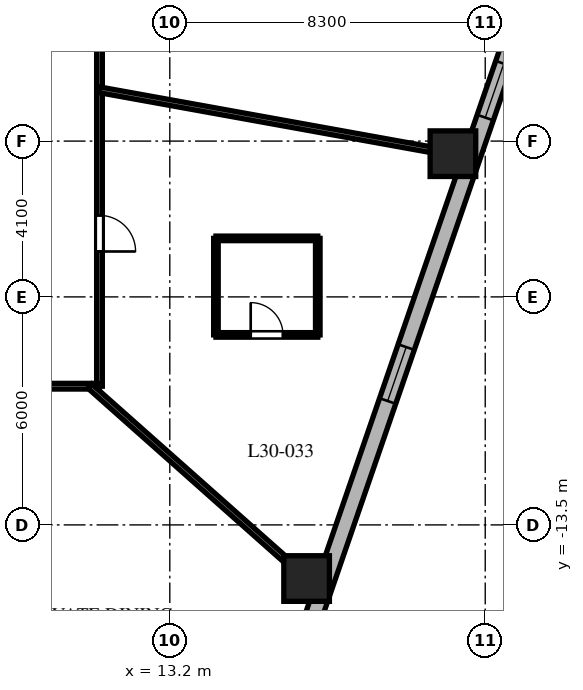
"""IFC4 building model, lengths in metres.
Left out: names, types, materials, properties, quantities, classifications, styles, units other than length and angle.
Written with IfcOpenShell. Run it as: python <this file> out.ifc"""

import sys

from ifc_helpers import new_model, si_unit, direction, frame, frame_2d, origin, origin_2d, place, context, subcontext, project, spatial, rectangle, extrude, element, fill, save


model = new_model("IFC4")
c1 = context("Model", 3, precision=1e-05, world=origin(), true_north=direction((0.0, 1.0)))
c2 = subcontext(c1, "Body", "Model", "MODEL_VIEW")
j1 = project(units=[si_unit("LENGTHUNIT", "METRE"), si_unit("PLANEANGLEUNIT", "RADIAN")], contexts=[c1])
p1 = place(None, origin())
s1 = spatial("IfcSite", under=j1, at=p1, CompositionType="ELEMENT")
p2 = place(p1, origin())
s2 = spatial("IfcBuilding", under=s1, at=p2, CompositionType="ELEMENT")
p3 = place(p2, frame((0.0, 0.0, 124.7)))
s3 = spatial("IfcBuildingStorey", under=s2, at=p3, CompositionType="ELEMENT", Elevation=124.7)
for number, where, z_axis, x_axis in (
    (1, (16.8, -14.911, 0.0), (0.0, 0.0, 1.0), (1.0, 0.0, 0.0)),
    (2, (20.65, -3.731, 0.0), (0.0, 0.0, 1.0), (1.0, 0.0, 0.0)),
):
    element("IfcColumn", number, at=place(p3, frame(where, z_axis=z_axis, x_axis=x_axis)), inside=s3, PredefinedType="COLUMN", context=c2, shape_type="SweptSolid", body=[
        extrude(rectangle(XDim=1.2, YDim=1.2, at=origin_2d()), origin(), (0.0, 0.0, 1.0), 3.7),
    ])
p4 = place(p3, frame((15.992, -18.777, 0.0), z_axis=(0.0, 0.0, 1.0), x_axis=(0.325606988926, 0.945505202927, 0.0)))
e3 = element("IfcWall", 3, at=p4, inside=s3, PredefinedType="SOLIDWALL", context=c2, shape_type="SweptSolid", body=[
    extrude(rectangle(XDim=19.669, YDim=0.45, at=frame_2d((9.835, 0.0))), origin(), (0.0, 0.0, 1.0), 3.4),
])
p5 = place(p4, frame((1.197, 0.0, 0.8)))
e4 = element("IfcOpeningElement", 4, at=p5, cuts=e3, PredefinedType="OPENING", context=c2, shape_type="SweptSolid", body=[
    extrude(rectangle(XDim=1.5, YDim=1.8, at=frame_2d((0.75, 0.9))), frame((0.0, 0.235, 0.0), z_axis=(0.0, -1.0, 0.0), x_axis=(1.0, 0.0, 0.0)), (0.0, 0.0, 1.0), 0.47),
])
p6 = place(p4, frame((9.03, 0.0, 0.8)))
e5 = element("IfcOpeningElement", 5, at=p6, cuts=e3, PredefinedType="OPENING", context=c2, shape_type="SweptSolid", body=[
    extrude(rectangle(XDim=1.5, YDim=1.8, at=frame_2d((0.75, 0.9))), frame((0.0, 0.235, 0.0), z_axis=(0.0, -1.0, 0.0), x_axis=(1.0, 0.0, 0.0)), (0.0, 0.0, 1.0), 0.47),
])
p7 = place(p4, frame((16.918, 0.0, 0.8)))
e6 = element("IfcOpeningElement", 6, at=p7, cuts=e3, PredefinedType="OPENING", context=c2, shape_type="SweptSolid", body=[
    extrude(rectangle(XDim=1.5, YDim=1.8, at=frame_2d((0.75, 0.9))), frame((0.0, 0.235, 0.0), z_axis=(0.0, -1.0, 0.0), x_axis=(1.0, 0.0, 0.0)), (0.0, 0.0, 1.0), 0.47),
])
p8 = place(p3, frame((11.35, 9.85, 0.0), z_axis=(0.0, 0.0, 1.0), x_axis=(0.0, -1.0, 0.0)))
e7 = element("IfcWall", 7, at=p8, inside=s3, PredefinedType="PARTITIONING", context=c2, shape_type="SweptSolid", body=[
    extrude(rectangle(XDim=19.7, YDim=0.15, at=frame_2d((9.85, 0.0))), origin(), (0.0, 0.0, 1.0), 2.84),
])
p9 = place(p8, frame((3.008, 0.0, 0.0)))
e8 = element("IfcOpeningElement", 8, at=p9, cuts=e7, PredefinedType="OPENING", context=c2, shape_type="SweptSolid", body=[
    extrude(rectangle(XDim=0.95, YDim=2.03, at=frame_2d((0.475, 1.015))), frame((0.0, 0.085, 0.0), z_axis=(0.0, -1.0, 0.0), x_axis=(1.0, 0.0, 0.0)), (0.0, 0.0, 1.0), 0.17),
])
p10 = place(p8, frame((15.205, 0.0, 0.0)))
e9 = element("IfcOpeningElement", 9, at=p10, cuts=e7, PredefinedType="OPENING", context=c2, shape_type="SweptSolid", body=[
    extrude(rectangle(XDim=0.95, YDim=2.03, at=frame_2d((0.475, 1.015))), frame((0.0, 0.085, 0.0), z_axis=(0.0, -1.0, 0.0), x_axis=(1.0, 0.0, 0.0)), (0.0, 0.0, 1.0), 0.17),
])
p11 = place(p8, frame((8.836, 0.0, 0.0)))
e10 = element("IfcOpeningElement", 10, at=p11, cuts=e7, PredefinedType="OPENING", context=c2, shape_type="SweptSolid", body=[
    extrude(rectangle(XDim=0.95, YDim=2.03, at=frame_2d((0.475, 1.015))), frame((0.0, 0.085, 0.0), z_axis=(0.0, -1.0, 0.0), x_axis=(1.0, 0.0, 0.0)), (0.0, 0.0, 1.0), 0.17),
])
p12 = place(p3, frame((11.35, -9.85, 0.0), z_axis=(0.0, 0.0, 1.0), x_axis=(-1.0, 0.0, 0.0)))
e11 = element("IfcWall", 11, at=p12, inside=s3, PredefinedType="PARTITIONING", context=c2, shape_type="SweptSolid", body=[
    extrude(rectangle(XDim=22.7, YDim=0.15, at=frame_2d((11.35, 0.0))), origin(), (0.0, 0.0, 1.0), 2.84),
])
p13 = place(p12, frame((17.237, 0.0, 0.0)))
e12 = element("IfcOpeningElement", 12, at=p13, cuts=e11, PredefinedType="OPENING", context=c2, shape_type="SweptSolid", body=[
    extrude(rectangle(XDim=0.95, YDim=2.03, at=frame_2d((0.475, 1.015))), frame((0.0, 0.085, 0.0), z_axis=(0.0, -1.0, 0.0), x_axis=(1.0, 0.0, 0.0)), (0.0, 0.0, 1.0), 0.17),
])
p14 = place(p12, frame((10.45, 0.0, 0.0)))
e13 = element("IfcOpeningElement", 13, at=p14, cuts=e11, PredefinedType="OPENING", context=c2, shape_type="SweptSolid", body=[
    extrude(rectangle(XDim=0.95, YDim=2.03, at=frame_2d((0.475, 1.015))), frame((0.0, 0.085, 0.0), z_axis=(0.0, -1.0, 0.0), x_axis=(1.0, 0.0, 0.0)), (0.0, 0.0, 1.0), 0.17),
])
p15 = place(p12, frame((3.399, 0.0, 0.0)))
e14 = element("IfcOpeningElement", 14, at=p15, cuts=e11, PredefinedType="OPENING", context=c2, shape_type="SweptSolid", body=[
    extrude(rectangle(XDim=0.95, YDim=2.03, at=frame_2d((0.475, 1.015))), frame((0.0, 0.085, 0.0), z_axis=(0.0, -1.0, 0.0), x_axis=(1.0, 0.0, 0.0)), (0.0, 0.0, 1.0), 0.17),
])
p16 = place(p3, frame((11.098, -9.85, 0.0), z_axis=(0.0, 0.0, 1.0), x_axis=(0.747904295103, -0.663806572253, 0.0)))
e15 = element("IfcWall", 15, at=p16, inside=s3, PredefinedType="PARTITIONING", context=c2, shape_type="SweptSolid", body=[
    extrude(rectangle(XDim=8.16, YDim=0.15, at=frame_2d((4.08, 0.0))), origin(), (0.0, 0.0, 1.0), 2.54),
])
p17 = place(p3, frame((11.35, -2.051, 0.0), z_axis=(0.0, 0.0, 1.0), x_axis=(0.984068313063, -0.177790762484, 0.0)))
e16 = element("IfcWall", 16, at=p17, inside=s3, PredefinedType="PARTITIONING", context=c2, shape_type="SweptSolid", body=[
    extrude(rectangle(XDim=9.951, YDim=0.15, at=frame_2d((4.976, 0.0))), origin(), (0.0, 0.0, 1.0), 2.54),
])
p18 = place(p3, frame((14.414, -8.5, 0.0), z_axis=(0.0, 0.0, 1.0), x_axis=(1.0, 0.0, 0.0)))
e17 = element("IfcWall", 17, at=p18, inside=s3, PredefinedType="PARTITIONING", context=c2, shape_type="SweptSolid", body=[
    extrude(rectangle(XDim=2.68, YDim=0.12, at=frame_2d((1.34, 0.0))), origin(), (0.0, 0.0, 1.0), 2.972),
])
p19 = place(p18, frame((0.915, 0.0, 0.0)))
e18 = element("IfcOpeningElement", 18, at=p19, cuts=e17, PredefinedType="OPENING", context=c2, shape_type="SweptSolid", body=[
    extrude(rectangle(XDim=0.85, YDim=2.03, at=frame_2d((0.425, 1.015))), frame((0.0, 0.07, 0.0), z_axis=(0.0, -1.0, 0.0), x_axis=(1.0, 0.0, 0.0)), (0.0, 0.0, 1.0), 0.14),
])
p20 = place(p3, frame((17.094, -8.5, 0.0), z_axis=(0.0, 0.0, 1.0), x_axis=(0.0, 1.0, 0.0)))
e19 = element("IfcWall", 19, at=p20, inside=s3, PredefinedType="PARTITIONING", context=c2, shape_type="SweptSolid", body=[
    extrude(rectangle(XDim=2.54, YDim=0.12, at=frame_2d((1.27, 0.0))), origin(), (0.0, 0.0, 1.0), 3.4),
])
p21 = place(p3, frame((17.094, -5.96, 0.0), z_axis=(0.0, 0.0, 1.0), x_axis=(-1.0, 0.0, 0.0)))
e20 = element("IfcWall", 20, at=p21, inside=s3, PredefinedType="PARTITIONING", context=c2, shape_type="SweptSolid", body=[
    extrude(rectangle(XDim=2.68, YDim=0.12, at=frame_2d((1.34, 0.0))), origin(), (0.0, 0.0, 1.0), 2.972),
])
p22 = place(p3, frame((14.414, -5.96, 0.0), z_axis=(0.0, 0.0, 1.0), x_axis=(0.0, -1.0, 0.0)))
e21 = element("IfcWall", 21, at=p22, inside=s3, PredefinedType="PARTITIONING", context=c2, shape_type="SweptSolid", body=[
    extrude(rectangle(XDim=2.54, YDim=0.12, at=frame_2d((1.27, 0.0))), origin(), (0.0, 0.0, 1.0), 3.4),
])
p23 = place(p6, origin())
e22 = element("IfcWindow", 22, at=p23, inside=s3, PartitioningType="SINGLE_PANEL", PredefinedType="WINDOW", context=c2, shape_type="SweptSolid", body=[
    extrude(rectangle(XDim=1.5, YDim=1.8, at=frame_2d((0.75, 0.9))), frame((0.0, 0.03, 0.0), z_axis=(0.0, -1.0, 0.0), x_axis=(1.0, 0.0, 0.0)), (0.0, 0.0, 1.0), 0.06),
])
fill(e5, e22)
p24 = place(p7, origin())
e23 = element("IfcWindow", 23, at=p24, inside=s3, PartitioningType="SINGLE_PANEL", PredefinedType="WINDOW", context=c2, shape_type="SweptSolid", body=[
    extrude(rectangle(XDim=1.5, YDim=1.8, at=frame_2d((0.75, 0.9))), frame((0.0, 0.03, 0.0), z_axis=(0.0, -1.0, 0.0), x_axis=(1.0, 0.0, 0.0)), (0.0, 0.0, 1.0), 0.06),
])
fill(e6, e23)
p25 = place(p10, origin())
e24 = element("IfcDoor", 24, at=p25, inside=s3, OperationType="SINGLE_SWING_RIGHT", PredefinedType="DOOR", context=c2, shape_type="SweptSolid", body=[
    extrude(rectangle(XDim=0.95, YDim=2.03, at=frame_2d((0.475, 1.015))), frame((0.0, 0.025, 0.0), z_axis=(0.0, -1.0, 0.0), x_axis=(1.0, 0.0, 0.0)), (0.0, 0.0, 1.0), 0.05),
])
fill(e9, e24)
p26 = place(p19, origin())
e25 = element("IfcDoor", 25, at=p26, inside=s3, OperationType="SINGLE_SWING_LEFT", PredefinedType="DOOR", context=c2, shape_type="SweptSolid", body=[
    extrude(rectangle(XDim=0.85, YDim=2.03, at=frame_2d((0.425, 1.015))), frame((0.0, 0.025, 0.0), z_axis=(0.0, -1.0, 0.0), x_axis=(1.0, 0.0, 0.0)), (0.0, 0.0, 1.0), 0.05),
])
fill(e18, e25)
save(model, sys.argv[1])
